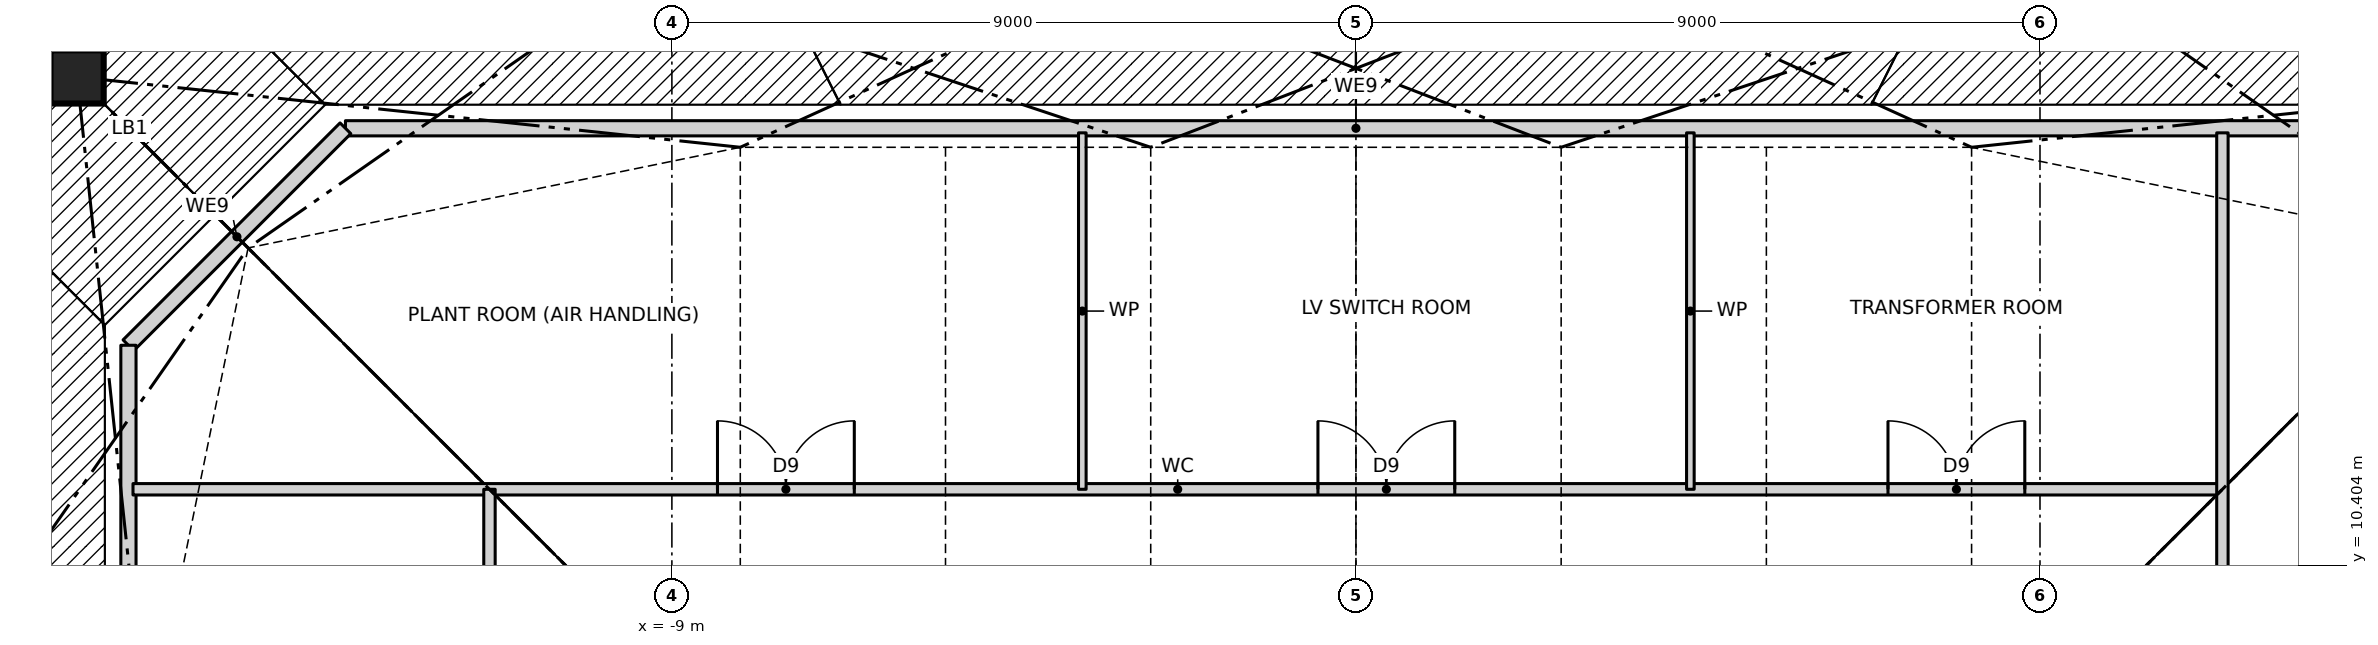
"""IFC4 building model, lengths in metres.
Left out: names, types, materials, properties, quantities, classifications, styles, units other than length and angle.
Written with IfcOpenShell. Run it as: python <this file> out.ifc"""

import sys

from ifc_helpers import new_model, si_unit, direction, frame, frame_2d, origin, origin_2d, place, context, subcontext, project, spatial, rectangle, hollow_rectangle, extrude, clip, halfspace, element, fill, save


model = new_model("IFC4")
c1 = context("Model", 3, precision=1e-05, world=origin(), true_north=direction((0.0, 1.0)))
c2 = subcontext(c1, "Body", "Model", "MODEL_VIEW")
j1 = project(units=[si_unit("LENGTHUNIT", "METRE"), si_unit("PLANEANGLEUNIT", "RADIAN")], contexts=[c1])
p1 = place(None, origin())
s1 = spatial("IfcSite", under=j1, at=p1, CompositionType="ELEMENT")
p2 = place(p1, origin())
s2 = spatial("IfcBuilding", under=s1, at=p2, CompositionType="ELEMENT")
p3 = place(p2, frame((0.0, 0.0, 209.0)))
s3 = spatial("IfcBuildingStorey", under=s2, at=p3, CompositionType="ELEMENT", Elevation=209.0)
p4 = place(p3, frame((9.45, 18.15, 0.0), z_axis=(-0.206127500627, -0.343583115532, 0.91622164142), x_axis=(0.857517554715, -0.514454704863, 0.0)))
e1 = element("IfcColumn", 1, at=p4, inside=s3, PredefinedType="COLUMN", context=c2, shape_type="Clipping", body=[
    clip(clip(extrude(hollow_rectangle(XDim=0.7, YDim=0.7, WallThickness=0.06, at=origin_2d()), origin(), (0.0, 0.0, 1.0), 6.549), halfspace(frame((0.0, 0.0, 0.0), z_axis=(0.0, -0.400671815572, -0.91622164142), x_axis=(0.857517554715, 0.471354534126, -0.206127500627)), False)), halfspace(frame((0.0, 2.404, 5.497), z_axis=(0.0, 0.400671815572, 0.91622164142), x_axis=(0.857517554715, 0.471354534126, -0.206127500627)), False)),
])
p5 = place(p3, frame((3.15, 18.15, 0.0), z_axis=(-0.070044605522, -0.350261033367, 0.934029422311), x_axis=(0.980584767795, -0.196095673508, 0.0)))
e2 = element("IfcColumn", 2, at=p5, inside=s3, PredefinedType="COLUMN", context=c2, shape_type="Clipping", body=[
    clip(clip(extrude(hollow_rectangle(XDim=0.7, YDim=0.7, WallThickness=0.06, at=origin_2d()), origin(), (0.0, 0.0, 1.0), 6.424), halfspace(frame((0.0, 0.0, 0.0), z_axis=(0.0, -0.357196078167, -0.934029422311), x_axis=(0.980584767795, 0.183159128644, -0.070044605522)), False)), halfspace(frame((0.0, 2.143, 5.604), z_axis=(0.0, 0.357196078167, 0.934029422311), x_axis=(0.980584767795, 0.183159128644, -0.070044605522)), False)),
])
p6 = place(p3, frame((-3.15, 18.15, 0.0), z_axis=(0.070044605522, -0.350261033367, 0.934029422311), x_axis=(0.980584767795, 0.196095673508, 0.0)))
e3 = element("IfcColumn", 3, at=p6, inside=s3, PredefinedType="COLUMN", context=c2, shape_type="Clipping", body=[
    clip(clip(extrude(hollow_rectangle(XDim=0.7, YDim=0.7, WallThickness=0.06, at=origin_2d()), origin(), (0.0, 0.0, 1.0), 6.424), halfspace(frame((0.0, 0.0, 0.0), z_axis=(0.0, -0.357196078167, -0.934029422311), x_axis=(0.980584767795, -0.183159128644, 0.070044605522)), False)), halfspace(frame((0.0, 2.143, 5.604), z_axis=(0.0, 0.357196078167, 0.934029422311), x_axis=(0.980584767795, -0.183159128644, 0.070044605522)), False)),
])
p7 = place(p3, frame((-9.45, 18.15, 0.0), z_axis=(0.206127500627, -0.343583115532, 0.91622164142), x_axis=(0.857517554715, 0.514454704863, 0.0)))
e4 = element("IfcColumn", 4, at=p7, inside=s3, PredefinedType="COLUMN", context=c2, shape_type="Clipping", body=[
    clip(clip(extrude(hollow_rectangle(XDim=0.7, YDim=0.7, WallThickness=0.06, at=origin_2d()), origin(), (0.0, 0.0, 1.0), 6.549), halfspace(frame((0.0, 0.0, 0.0), z_axis=(0.0, -0.400671815572, -0.91622164142), x_axis=(0.857517554715, -0.471354534126, 0.206127500627)), False)), halfspace(frame((0.0, 2.404, 5.497), z_axis=(0.0, 0.400671815572, 0.91622164142), x_axis=(0.857517554715, -0.471354534126, 0.206127500627)), False)),
])
p8 = place(p3, frame((-16.826, 16.826, 0.0), z_axis=(0.331294578225, -0.331294578225, 0.883452208599), x_axis=(0.707106781187, 0.707106781187, 0.0)))
e5 = element("IfcColumn", 5, at=p8, inside=s3, PredefinedType="COLUMN", context=c2, shape_type="Clipping", body=[
    clip(clip(extrude(hollow_rectangle(XDim=0.7, YDim=0.7, WallThickness=0.22, at=origin_2d()), origin(), (0.0, 0.0, 1.0), 6.792), halfspace(frame((0.0, 0.0, 0.0), z_axis=(0.0, -0.468521285666, -0.883452208599), x_axis=(0.707106781187, -0.624695047554, 0.331294578225)), False)), halfspace(frame((0.0, 2.811, 5.301), z_axis=(0.0, 0.468521285666, 0.883452208599), x_axis=(0.707106781187, -0.624695047554, 0.331294578225)), False)),
])
p9 = place(p3, frame((13.295, 16.15, 0.0), z_axis=(0.0, 0.0, 1.0), x_axis=(-1.0, 0.0, 0.0)))
e6 = element("IfcWall", 6, at=p9, inside=s3, PredefinedType="PARTITIONING", context=c2, shape_type="SweptSolid", body=[
    extrude(rectangle(XDim=26.59, YDim=0.2, at=frame_2d((13.295, 0.0))), origin(), (0.0, 0.0, 1.0), 5.7),
])
p10 = place(p3, frame((-13.295, 16.15, 0.0), z_axis=(0.0, 0.0, 1.0), x_axis=(-0.707106781187, -0.707106781187, 0.0)))
e7 = element("IfcWall", 7, at=p10, inside=s3, PredefinedType="PARTITIONING", context=c2, shape_type="SweptSolid", body=[
    extrude(rectangle(XDim=4.038, YDim=0.2, at=frame_2d((2.019, 0.0))), origin(), (0.0, 0.0, 1.0), 5.7),
])
p11 = place(p3, frame((-16.15, 13.295, 0.0), z_axis=(0.0, 0.0, 1.0), x_axis=(0.0, -1.0, 0.0)))
e8 = element("IfcWall", 8, at=p11, inside=s3, PredefinedType="PARTITIONING", context=c2, shape_type="SweptSolid", body=[
    extrude(rectangle(XDim=26.59, YDim=0.2, at=frame_2d((13.295, 0.0))), origin(), (0.0, 0.0, 1.0), 5.7),
])
p12 = place(p3, frame((-16.09, 11.4, 0.0), z_axis=(0.0, 0.0, 1.0), x_axis=(1.0, 0.0, 0.0)))
e9 = element("IfcWall", 9, at=p12, inside=s3, PredefinedType="PARTITIONING", context=c2, shape_type="SweptSolid", body=[
    extrude(rectangle(XDim=27.49, YDim=0.15, at=frame_2d((13.745, 0.0))), origin(), (0.0, 0.0, 1.0), 5.77),
])
p13 = place(p12, frame((23.09, 0.0, 0.0)))
e10 = element("IfcOpeningElement", 10, at=p13, cuts=e9, PredefinedType="OPENING", context=c2, shape_type="SweptSolid", body=[
    extrude(rectangle(XDim=1.8, YDim=2.1, at=frame_2d((0.9, 1.05))), frame((0.0, 0.085, 0.0), z_axis=(0.0, -1.0, 0.0), x_axis=(1.0, 0.0, 0.0)), (0.0, 0.0, 1.0), 0.17),
])
p14 = place(p12, frame((15.59, 0.0, 0.0)))
e11 = element("IfcOpeningElement", 11, at=p14, cuts=e9, PredefinedType="OPENING", context=c2, shape_type="SweptSolid", body=[
    extrude(rectangle(XDim=1.8, YDim=2.1, at=frame_2d((0.9, 1.05))), frame((0.0, 0.085, 0.0), z_axis=(0.0, -1.0, 0.0), x_axis=(1.0, 0.0, 0.0)), (0.0, 0.0, 1.0), 0.17),
])
p15 = place(p12, frame((7.69, 0.0, 0.0)))
e12 = element("IfcOpeningElement", 12, at=p15, cuts=e9, PredefinedType="OPENING", context=c2, shape_type="SweptSolid", body=[
    extrude(rectangle(XDim=1.8, YDim=2.1, at=frame_2d((0.9, 1.05))), frame((0.0, 0.085, 0.0), z_axis=(0.0, -1.0, 0.0), x_axis=(1.0, 0.0, 0.0)), (0.0, 0.0, 1.0), 0.17),
])
p16 = place(p3, frame((11.4, -11.4, 0.0), z_axis=(0.0, 0.0, 1.0), x_axis=(0.0, 1.0, 0.0)))
e13 = element("IfcWall", 13, at=p16, inside=s3, PredefinedType="PARTITIONING", context=c2, shape_type="SweptSolid", body=[
    extrude(rectangle(XDim=27.49, YDim=0.15, at=frame_2d((13.745, 0.0))), origin(), (0.0, 0.0, 1.0), 5.77),
])
p17 = place(p16, frame((10.5, 0.0, 0.0)))
e14 = element("IfcOpeningElement", 14, at=p17, cuts=e13, PredefinedType="OPENING", context=c2, shape_type="SweptSolid", body=[
    extrude(rectangle(XDim=1.8, YDim=2.1, at=frame_2d((0.9, 1.05))), frame((0.0, 0.085, 0.0), z_axis=(0.0, -1.0, 0.0), x_axis=(1.0, 0.0, 0.0)), (0.0, 0.0, 1.0), 0.17),
])
for number, where, z_axis, x_axis in (
    (15, (4.4, 11.4, 0.0), (0.0, 0.0, 1.0), (0.0, 1.0, 0.0)),
    (16, (-3.6, 11.4, 0.0), (0.0, 0.0, 1.0), (0.0, 1.0, 0.0)),
):
    element("IfcWall", number, at=place(p3, frame(where, z_axis=z_axis, x_axis=x_axis)), inside=s3, PredefinedType="PARTITIONING", context=c2, shape_type="SweptSolid", body=[
        extrude(rectangle(XDim=4.69, YDim=0.1, at=frame_2d((2.345, 0.0))), origin(), (0.0, 0.0, 1.0), 5.77),
    ])
p18 = place(p3, frame((-11.4, -16.09, 0.0), z_axis=(0.0, 0.0, 1.0), x_axis=(0.0, 1.0, 0.0)))
e17 = element("IfcWall", 17, at=p18, inside=s3, PredefinedType="PARTITIONING", context=c2, shape_type="SweptSolid", body=[
    extrude(rectangle(XDim=27.49, YDim=0.15, at=frame_2d((13.745, 0.0))), origin(), (0.0, 0.0, 1.0), 5.77),
])
p19 = place(p18, frame((15.19, 0.0, 0.0)))
e18 = element("IfcOpeningElement", 18, at=p19, cuts=e17, PredefinedType="OPENING", context=c2, shape_type="SweptSolid", body=[
    extrude(rectangle(XDim=1.8, YDim=2.1, at=frame_2d((0.9, 1.05))), frame((0.0, 0.085, 0.0), z_axis=(0.0, -1.0, 0.0), x_axis=(1.0, 0.0, 0.0)), (0.0, 0.0, 1.0), 0.17),
])
p20 = place(p13, origin())
e19 = element("IfcDoor", 19, at=p20, inside=s3, OperationType="DOUBLE_DOOR_SINGLE_SWING", PredefinedType="DOOR", context=c2, shape_type="SweptSolid", body=[
    extrude(rectangle(XDim=1.8, YDim=2.1, at=frame_2d((0.9, 1.05))), frame((0.0, 0.025, 0.0), z_axis=(0.0, -1.0, 0.0), x_axis=(1.0, 0.0, 0.0)), (0.0, 0.0, 1.0), 0.05),
])
fill(e10, e19)
p21 = place(p14, origin())
e20 = element("IfcDoor", 20, at=p21, inside=s3, OperationType="DOUBLE_DOOR_SINGLE_SWING", PredefinedType="DOOR", context=c2, shape_type="SweptSolid", body=[
    extrude(rectangle(XDim=1.8, YDim=2.1, at=frame_2d((0.9, 1.05))), frame((0.0, 0.025, 0.0), z_axis=(0.0, -1.0, 0.0), x_axis=(1.0, 0.0, 0.0)), (0.0, 0.0, 1.0), 0.05),
])
fill(e11, e20)
p22 = place(p15, origin())
e21 = element("IfcDoor", 21, at=p22, inside=s3, OperationType="DOUBLE_DOOR_SINGLE_SWING", PredefinedType="DOOR", context=c2, shape_type="SweptSolid", body=[
    extrude(rectangle(XDim=1.8, YDim=2.1, at=frame_2d((0.9, 1.05))), frame((0.0, 0.025, 0.0), z_axis=(0.0, -1.0, 0.0), x_axis=(1.0, 0.0, 0.0)), (0.0, 0.0, 1.0), 0.05),
])
fill(e12, e21)
save(model, sys.argv[1])
